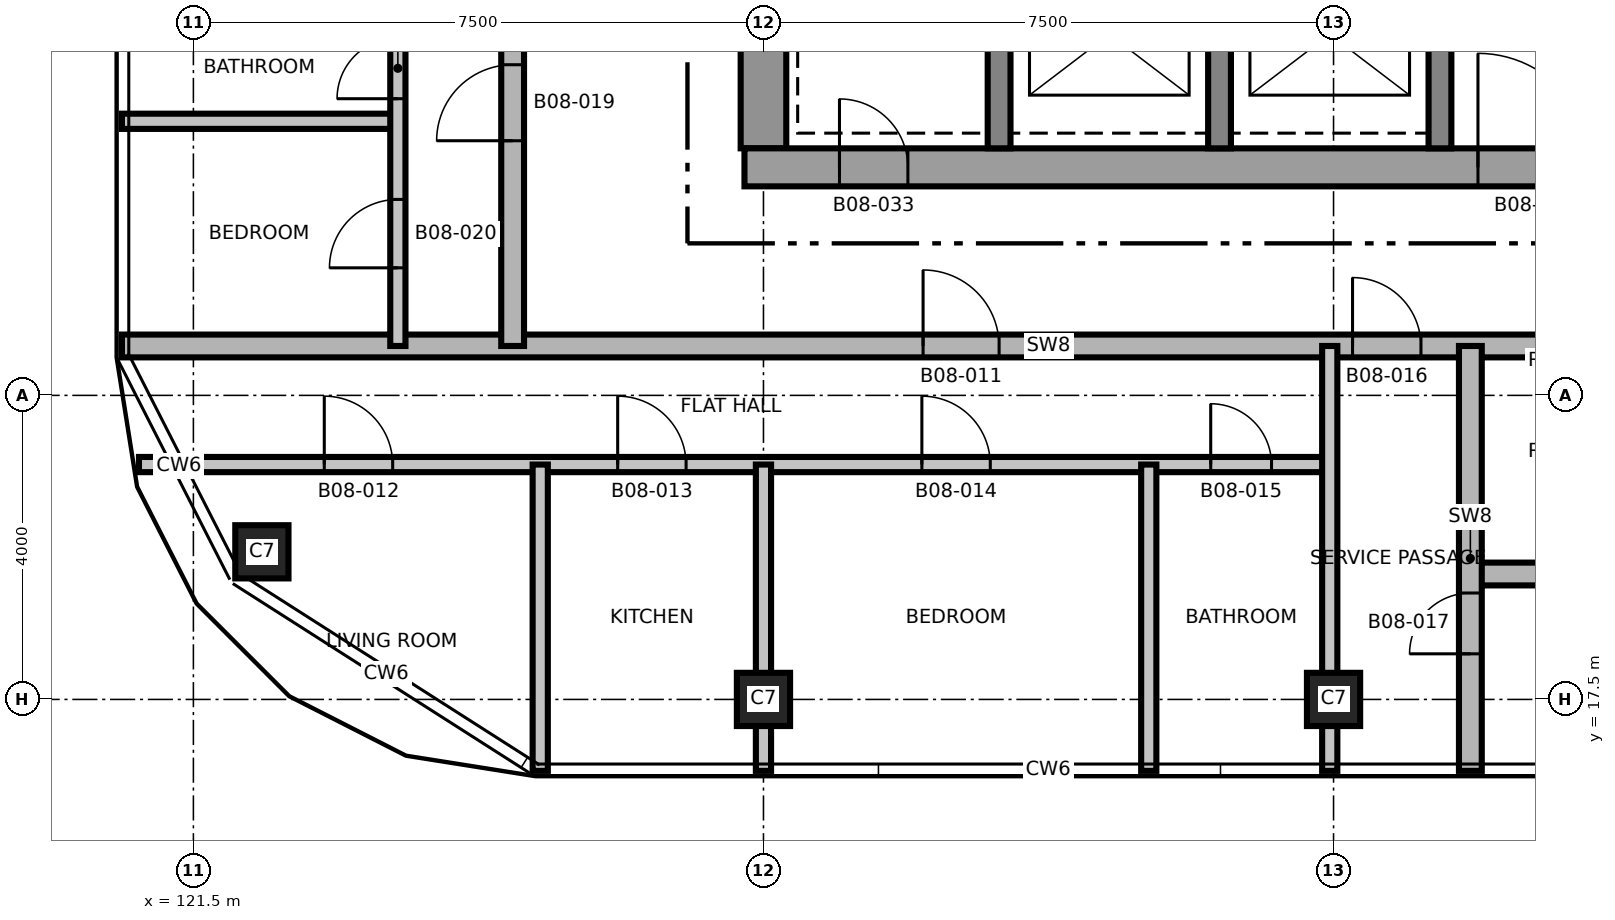
"""IFC4 building model, lengths in metres.
Left out: names, types, materials, properties, quantities, classifications, styles, units other than length and angle.
Written with IfcOpenShell. Run it as: python <this file> out.ifc"""

import sys

from ifc_helpers import new_model, si_unit, direction, frame, frame_2d, origin, origin_2d, place, context, subcontext, project, spatial, rectangle, extrude, element, fill, save


model = new_model("IFC4")
c1 = context("Model", 3, precision=1e-05, world=origin(), true_north=direction((0.0, 1.0)))
c2 = subcontext(c1, "Body", "Model", "MODEL_VIEW")
j1 = project(units=[si_unit("LENGTHUNIT", "METRE"), si_unit("PLANEANGLEUNIT", "RADIAN")], contexts=[c1])
p1 = place(None, origin())
s1 = spatial("IfcSite", under=j1, at=p1, CompositionType="ELEMENT")
p2 = place(p1, origin())
s2 = spatial("IfcBuilding", under=s1, at=p2, CompositionType="ELEMENT")
p3 = place(p2, frame((0.0, 0.0, 94.5)))
s3 = spatial("IfcBuildingStorey", under=s2, at=p3, CompositionType="ELEMENT", Elevation=94.5)
p4 = place(p3, frame((129.0, 24.75, 0.0), z_axis=(0.0, 0.0, 1.0), x_axis=(0.0, 1.0, 0.0)))
e1 = element("IfcWall", 1, at=p4, inside=s3, PredefinedType="SHEAR", context=c2, shape_type="SweptSolid", body=[
    extrude(rectangle(XDim=12.5, YDim=0.6, at=frame_2d((6.25, 0.0))), origin(), (0.0, 0.0, 1.0), 3.7),
])
p5 = place(p4, frame((5.15, 0.0, 0.0)))
e2 = element("IfcOpeningElement", 2, at=p5, cuts=e1, PredefinedType="OPENING", context=c2, shape_type="SweptSolid", body=[
    extrude(rectangle(XDim=1.0, YDim=2.1, at=frame_2d((0.5, 1.05))), frame((0.0, 0.31, 0.0), z_axis=(0.0, -1.0, 0.0), x_axis=(1.0, 0.0, 0.0)), (0.0, 0.0, 1.0), 0.62),
])
p6 = place(p3, frame((128.75, 24.5, 0.0), z_axis=(0.0, 0.0, 1.0), x_axis=(1.0, 0.0, 0.0)))
e3 = element("IfcWall", 3, at=p6, inside=s3, PredefinedType="SHEAR", context=c2, shape_type="SweptSolid", body=[
    extrude(rectangle(XDim=15.0, YDim=0.5, at=frame_2d((7.5, 0.0))), origin(), (0.0, 0.0, 1.0), 3.7),
])
p7 = place(p6, frame((9.65, 0.0, 0.0)))
e4 = element("IfcOpeningElement", 4, at=p7, cuts=e3, PredefinedType="OPENING", context=c2, shape_type="SweptSolid", body=[
    extrude(rectangle(XDim=1.5, YDim=2.1, at=frame_2d((0.75, 1.05))), frame((0.0, 0.26, 0.0), z_axis=(0.0, -1.0, 0.0), x_axis=(1.0, 0.0, 0.0)), (0.0, 0.0, 1.0), 0.52),
])
p8 = place(p6, frame((1.25, 0.0, 0.0)))
e5 = element("IfcOpeningElement", 5, at=p8, cuts=e3, PredefinedType="OPENING", context=c2, shape_type="SweptSolid", body=[
    extrude(rectangle(XDim=0.9, YDim=2.1, at=frame_2d((0.45, 1.05))), frame((0.0, 0.26, 0.0), z_axis=(0.0, -1.0, 0.0), x_axis=(1.0, 0.0, 0.0)), (0.0, 0.0, 1.0), 0.52),
])
p9 = place(p3, frame((132.1, 24.75, 0.0), z_axis=(0.0, 0.0, 1.0), x_axis=(0.0, 1.0, 0.0)))
e6 = element("IfcWall", 6, at=p9, inside=s3, PredefinedType="SHEAR", context=c2, shape_type="SweptSolid", body=[
    extrude(rectangle(XDim=12.5, YDim=0.3, at=frame_2d((6.25, 0.0))), origin(), (0.0, 0.0, 1.0), 3.7),
])
p10 = place(p9, frame((3.9, 0.0, 0.0)))
e7 = element("IfcOpeningElement", 7, at=p10, cuts=e6, PredefinedType="OPENING", context=c2, shape_type="SweptSolid", body=[
    extrude(rectangle(XDim=1.2, YDim=2.1, at=frame_2d((0.6, 1.05))), frame((0.0, 0.16, 0.0), z_axis=(0.0, -1.0, 0.0), x_axis=(1.0, 0.0, 0.0)), (0.0, 0.0, 1.0), 0.32),
])
p11 = place(p3, frame((137.9, 24.75, 0.0), z_axis=(0.0, 0.0, 1.0), x_axis=(0.0, 1.0, 0.0)))
e8 = element("IfcWall", 8, at=p11, inside=s3, PredefinedType="SHEAR", context=c2, shape_type="SweptSolid", body=[
    extrude(rectangle(XDim=12.5, YDim=0.3, at=frame_2d((6.25, 0.0))), origin(), (0.0, 0.0, 1.0), 3.7),
])
p12 = place(p11, frame((3.95, 0.0, 0.0)))
e9 = element("IfcOpeningElement", 9, at=p12, cuts=e8, PredefinedType="OPENING", context=c2, shape_type="SweptSolid", body=[
    extrude(rectangle(XDim=1.5, YDim=2.1, at=frame_2d((0.75, 1.05))), frame((0.0, 0.16, 0.0), z_axis=(0.0, -1.0, 0.0), x_axis=(1.0, 0.0, 0.0)), (0.0, 0.0, 1.0), 0.32),
])
p13 = place(p11, frame((10.45, 0.0, 0.0)))
e10 = element("IfcOpeningElement", 10, at=p13, cuts=e8, PredefinedType="OPENING", context=c2, shape_type="SweptSolid", body=[
    extrude(rectangle(XDim=0.9, YDim=2.1, at=frame_2d((0.45, 1.05))), frame((0.0, 0.16, 0.0), z_axis=(0.0, -1.0, 0.0), x_axis=(1.0, 0.0, 0.0)), (0.0, 0.0, 1.0), 0.32),
])
p14 = place(p3, frame((135.0, 24.75, 0.0), z_axis=(0.0, 0.0, 1.0), x_axis=(0.0, 1.0, 0.0)))
e11 = element("IfcWall", 11, at=p14, inside=s3, PredefinedType="SHEAR", context=c2, shape_type="SweptSolid", body=[
    extrude(rectangle(XDim=2.8, YDim=0.3, at=frame_2d((1.4, 0.0))), origin(), (0.0, 0.0, 1.0), 3.7),
])
for number, where, z_axis, x_axis in (
    (12, (129.0, 17.5, 0.0), (0.0, 0.0, 1.0), (1.0, 0.0, 0.0)),
    (13, (136.5, 17.5, 0.0), (0.0, 0.0, 1.0), (1.0, 0.0, 0.0)),
    (14, (122.401, 19.442, 0.0), (0.0, 0.0, 1.0), (1.0, 0.0, 0.0)),
):
    element("IfcColumn", number, at=place(p3, frame(where, z_axis=z_axis, x_axis=x_axis)), inside=s3, PredefinedType="COLUMN", context=c2, shape_type="SweptSolid", body=[
        extrude(rectangle(XDim=0.7, YDim=0.7, at=origin_2d()), origin(), (0.0, 0.0, 1.0), 3.7),
    ])
p15 = place(p3, frame((138.25, 19.15, 0.0), z_axis=(0.0, 0.0, 1.0), x_axis=(1.0, 0.0, 0.0)))
e15 = element("IfcWall", 15, at=p15, inside=s3, PredefinedType="SHEAR", context=c2, shape_type="SweptSolid", body=[
    extrude(rectangle(XDim=5.75, YDim=0.3, at=frame_2d((2.875, 0.0))), origin(), (0.0, 0.0, 1.0), 3.4),
])
p16 = place(p3, frame((120.784, 20.59, 0.0), z_axis=(0.0, 0.0, 1.0), x_axis=(1.0, 0.0, 0.0)))
e16 = element("IfcWall", 16, at=p16, inside=s3, PredefinedType="PARTITIONING", context=c2, shape_type="SweptSolid", body=[
    extrude(rectangle(XDim=15.716, YDim=0.2, at=frame_2d((7.858, 0.0))), origin(), (0.0, 0.0, 1.0), 3.4),
])
p17 = place(p16, frame((2.438, 0.0, 0.0)))
e17 = element("IfcOpeningElement", 17, at=p17, cuts=e16, PredefinedType="OPENING", context=c2, shape_type="SweptSolid", body=[
    extrude(rectangle(XDim=0.9, YDim=2.1, at=frame_2d((0.45, 1.05))), frame((0.0, 0.11, 0.0), z_axis=(0.0, -1.0, 0.0), x_axis=(1.0, 0.0, 0.0)), (0.0, 0.0, 1.0), 0.22),
])
p18 = place(p16, frame((6.298, 0.0, 0.0)))
e18 = element("IfcOpeningElement", 18, at=p18, cuts=e16, PredefinedType="OPENING", context=c2, shape_type="SweptSolid", body=[
    extrude(rectangle(XDim=0.9, YDim=2.1, at=frame_2d((0.45, 1.05))), frame((0.0, 0.11, 0.0), z_axis=(0.0, -1.0, 0.0), x_axis=(1.0, 0.0, 0.0)), (0.0, 0.0, 1.0), 0.22),
])
p19 = place(p16, frame((10.3, 0.0, 0.0)))
e19 = element("IfcOpeningElement", 19, at=p19, cuts=e16, PredefinedType="OPENING", context=c2, shape_type="SweptSolid", body=[
    extrude(rectangle(XDim=0.9, YDim=2.1, at=frame_2d((0.45, 1.05))), frame((0.0, 0.11, 0.0), z_axis=(0.0, -1.0, 0.0), x_axis=(1.0, 0.0, 0.0)), (0.0, 0.0, 1.0), 0.22),
])
p20 = place(p16, frame((14.1, 0.0, 0.0)))
e20 = element("IfcOpeningElement", 20, at=p20, cuts=e16, PredefinedType="OPENING", context=c2, shape_type="SweptSolid", body=[
    extrude(rectangle(XDim=0.8, YDim=2.1, at=frame_2d((0.4, 1.05))), frame((0.0, 0.11, 0.0), z_axis=(0.0, -1.0, 0.0), x_axis=(1.0, 0.0, 0.0)), (0.0, 0.0, 1.0), 0.22),
])
p21 = place(p3, frame((120.56, 22.15, 0.0), z_axis=(0.0, 0.0, 1.0), x_axis=(1.0, 0.0, 0.0)))
e21 = element("IfcWall", 21, at=p21, inside=s3, PredefinedType="SHEAR", context=c2, shape_type="SweptSolid", body=[
    extrude(rectangle(XDim=24.38, YDim=0.3, at=frame_2d((12.19, 0.0))), origin(), (0.0, 0.0, 1.0), 3.4),
])
p22 = place(p21, frame((22.19, 0.0, 0.0)))
e22 = element("IfcOpeningElement", 22, at=p22, cuts=e21, PredefinedType="OPENING", context=c2, shape_type="SweptSolid", body=[
    extrude(rectangle(XDim=1.0, YDim=2.1, at=frame_2d((0.5, 1.05))), frame((0.0, 0.16, 0.0), z_axis=(0.0, -1.0, 0.0), x_axis=(1.0, 0.0, 0.0)), (0.0, 0.0, 1.0), 0.32),
])
p23 = place(p21, frame((10.54, 0.0, 0.0)))
e23 = element("IfcOpeningElement", 23, at=p23, cuts=e21, PredefinedType="OPENING", context=c2, shape_type="SweptSolid", body=[
    extrude(rectangle(XDim=1.0, YDim=2.1, at=frame_2d((0.5, 1.05))), frame((0.0, 0.16, 0.0), z_axis=(0.0, -1.0, 0.0), x_axis=(1.0, 0.0, 0.0)), (0.0, 0.0, 1.0), 0.32),
])
p24 = place(p21, frame((16.19, 0.0, 0.0)))
e24 = element("IfcOpeningElement", 24, at=p24, cuts=e21, PredefinedType="OPENING", context=c2, shape_type="SweptSolid", body=[
    extrude(rectangle(XDim=0.9, YDim=2.1, at=frame_2d((0.45, 1.05))), frame((0.0, 0.16, 0.0), z_axis=(0.0, -1.0, 0.0), x_axis=(1.0, 0.0, 0.0)), (0.0, 0.0, 1.0), 0.32),
])
p25 = place(p3, frame((120.56, 25.106, 0.0), z_axis=(0.0, 0.0, 1.0), x_axis=(1.0, 0.0, 0.0)))
e25 = element("IfcWall", 25, at=p25, inside=s3, PredefinedType="PARTITIONING", context=c2, shape_type="SweptSolid", body=[
    extrude(rectangle(XDim=3.63, YDim=0.2, at=frame_2d((1.815, 0.0))), origin(), (0.0, 0.0, 1.0), 3.4),
])
p26 = place(p3, frame((124.19, 22.15, 0.0), z_axis=(0.0, 0.0, 1.0), x_axis=(0.0, 1.0, 0.0)))
e26 = element("IfcWall", 26, at=p26, inside=s3, PredefinedType="PARTITIONING", context=c2, shape_type="SweptSolid", body=[
    extrude(rectangle(XDim=17.7, YDim=0.2, at=frame_2d((8.85, 0.0))), origin(), (0.0, 0.0, 1.0), 3.4),
])
p27 = place(p26, frame((1.028, 0.0, 0.0)))
e27 = element("IfcOpeningElement", 27, at=p27, cuts=e26, PredefinedType="OPENING", context=c2, shape_type="SweptSolid", body=[
    extrude(rectangle(XDim=0.9, YDim=2.1, at=frame_2d((0.45, 1.05))), frame((0.0, 0.11, 0.0), z_axis=(0.0, -1.0, 0.0), x_axis=(1.0, 0.0, 0.0)), (0.0, 0.0, 1.0), 0.22),
])
p28 = place(p26, frame((3.253, 0.0, 0.0)))
e28 = element("IfcOpeningElement", 28, at=p28, cuts=e26, PredefinedType="OPENING", context=c2, shape_type="SweptSolid", body=[
    extrude(rectangle(XDim=0.8, YDim=2.1, at=frame_2d((0.4, 1.05))), frame((0.0, 0.11, 0.0), z_axis=(0.0, -1.0, 0.0), x_axis=(1.0, 0.0, 0.0)), (0.0, 0.0, 1.0), 0.22),
])
p29 = place(p26, frame((6.195, 0.0, 0.0)))
e29 = element("IfcOpeningElement", 29, at=p29, cuts=e26, PredefinedType="OPENING", context=c2, shape_type="SweptSolid", body=[
    extrude(rectangle(XDim=0.9, YDim=2.1, at=frame_2d((0.45, 1.05))), frame((0.0, 0.11, 0.0), z_axis=(0.0, -1.0, 0.0), x_axis=(1.0, 0.0, 0.0)), (0.0, 0.0, 1.0), 0.22),
])
p30 = place(p26, frame((9.641, 0.0, 0.0)))
e30 = element("IfcOpeningElement", 30, at=p30, cuts=e26, PredefinedType="OPENING", context=c2, shape_type="SweptSolid", body=[
    extrude(rectangle(XDim=0.9, YDim=2.1, at=frame_2d((0.45, 1.05))), frame((0.0, 0.11, 0.0), z_axis=(0.0, -1.0, 0.0), x_axis=(1.0, 0.0, 0.0)), (0.0, 0.0, 1.0), 0.22),
])
p31 = place(p26, frame((11.895, 0.0, 0.0)))
e31 = element("IfcOpeningElement", 31, at=p31, cuts=e26, PredefinedType="OPENING", context=c2, shape_type="SweptSolid", body=[
    extrude(rectangle(XDim=0.8, YDim=2.1, at=frame_2d((0.4, 1.05))), frame((0.0, 0.11, 0.0), z_axis=(0.0, -1.0, 0.0), x_axis=(1.0, 0.0, 0.0)), (0.0, 0.0, 1.0), 0.22),
])
p32 = place(p26, frame((14.378, 0.0, 0.0)))
e32 = element("IfcOpeningElement", 32, at=p32, cuts=e26, PredefinedType="OPENING", context=c2, shape_type="SweptSolid", body=[
    extrude(rectangle(XDim=0.9, YDim=2.1, at=frame_2d((0.45, 1.05))), frame((0.0, 0.11, 0.0), z_axis=(0.0, -1.0, 0.0), x_axis=(1.0, 0.0, 0.0)), (0.0, 0.0, 1.0), 0.22),
])
p33 = place(p26, frame((16.603, 0.0, 0.0)))
e33 = element("IfcOpeningElement", 33, at=p33, cuts=e26, PredefinedType="OPENING", context=c2, shape_type="SweptSolid", body=[
    extrude(rectangle(XDim=0.8, YDim=2.1, at=frame_2d((0.4, 1.05))), frame((0.0, 0.11, 0.0), z_axis=(0.0, -1.0, 0.0), x_axis=(1.0, 0.0, 0.0)), (0.0, 0.0, 1.0), 0.22),
])
p34 = place(p3, frame((125.7, 22.15, 0.0), z_axis=(0.0, 0.0, 1.0), x_axis=(0.0, 1.0, 0.0)))
e34 = element("IfcWall", 34, at=p34, inside=s3, PredefinedType="SHEAR", context=c2, shape_type="SweptSolid", body=[
    extrude(rectangle(XDim=17.7, YDim=0.3, at=frame_2d((8.85, 0.0))), origin(), (0.0, 0.0, 1.0), 3.4),
])
p35 = place(p34, frame((2.7, 0.0, 0.0)))
e35 = element("IfcOpeningElement", 35, at=p35, cuts=e34, PredefinedType="OPENING", context=c2, shape_type="SweptSolid", body=[
    extrude(rectangle(XDim=1.0, YDim=2.1, at=frame_2d((0.5, 1.05))), frame((0.0, 0.16, 0.0), z_axis=(0.0, -1.0, 0.0), x_axis=(1.0, 0.0, 0.0)), (0.0, 0.0, 1.0), 0.32),
])
for number, where, z_axis, x_axis in (
    (36, (126.063, 16.56, 0.0), (0.0, 0.0, 1.0), (0.0, 1.0, 0.0)),
    (37, (129.0, 16.56, 0.0), (0.0, 0.0, 1.0), (0.0, 1.0, 0.0)),
    (38, (134.069, 16.56, 0.0), (0.0, 0.0, 1.0), (0.0, 1.0, 0.0)),
):
    element("IfcWall", number, at=place(p3, frame(where, z_axis=z_axis, x_axis=x_axis)), inside=s3, PredefinedType="PARTITIONING", context=c2, shape_type="SweptSolid", body=[
        extrude(rectangle(XDim=4.03, YDim=0.2, at=frame_2d((2.015, 0.0))), origin(), (0.0, 0.0, 1.0), 3.4),
    ])
p36 = place(p3, frame((136.45, 16.56, 0.0), z_axis=(0.0, 0.0, 1.0), x_axis=(0.0, 1.0, 0.0)))
e39 = element("IfcWall", 39, at=p36, inside=s3, PredefinedType="PARTITIONING", context=c2, shape_type="SweptSolid", body=[
    extrude(rectangle(XDim=5.59, YDim=0.2, at=frame_2d((2.795, 0.0))), origin(), (0.0, 0.0, 1.0), 3.4),
])
p37 = place(p3, frame((138.3, 16.56, 0.0), z_axis=(0.0, 0.0, 1.0), x_axis=(0.0, 1.0, 0.0)))
e40 = element("IfcWall", 40, at=p37, inside=s3, PredefinedType="SHEAR", context=c2, shape_type="SweptSolid", body=[
    extrude(rectangle(XDim=5.59, YDim=0.3, at=frame_2d((2.795, 0.0))), origin(), (0.0, 0.0, 1.0), 3.4),
])
p38 = place(p37, frame((1.54, 0.0, 0.0)))
e41 = element("IfcOpeningElement", 41, at=p38, cuts=e40, PredefinedType="OPENING", context=c2, shape_type="SweptSolid", body=[
    extrude(rectangle(XDim=0.8, YDim=2.1, at=frame_2d((0.4, 1.05))), frame((0.0, 0.16, 0.0), z_axis=(0.0, -1.0, 0.0), x_axis=(1.0, 0.0, 0.0)), (0.0, 0.0, 1.0), 0.32),
])
p39 = place(p23, origin())
e42 = element("IfcDoor", 42, at=p39, inside=s3, OperationType="SINGLE_SWING_LEFT", PredefinedType="DOOR", context=c2, shape_type="SweptSolid", body=[
    extrude(rectangle(XDim=1.0, YDim=2.1, at=frame_2d((0.5, 1.05))), frame((0.0, 0.025, 0.0), z_axis=(0.0, -1.0, 0.0), x_axis=(1.0, 0.0, 0.0)), (0.0, 0.0, 1.0), 0.05),
])
fill(e23, e42)
p40 = place(p17, origin())
e43 = element("IfcDoor", 43, at=p40, inside=s3, OperationType="SINGLE_SWING_RIGHT", PredefinedType="DOOR", context=c2, shape_type="SweptSolid", body=[
    extrude(rectangle(XDim=0.9, YDim=2.1, at=frame_2d((0.45, 1.05))), frame((0.0, 0.025, 0.0), z_axis=(0.0, -1.0, 0.0), x_axis=(1.0, 0.0, 0.0)), (0.0, 0.0, 1.0), 0.05),
])
fill(e17, e43)
p41 = place(p18, origin())
e44 = element("IfcDoor", 44, at=p41, inside=s3, OperationType="SINGLE_SWING_LEFT", PredefinedType="DOOR", context=c2, shape_type="SweptSolid", body=[
    extrude(rectangle(XDim=0.9, YDim=2.1, at=frame_2d((0.45, 1.05))), frame((0.0, 0.025, 0.0), z_axis=(0.0, -1.0, 0.0), x_axis=(1.0, 0.0, 0.0)), (0.0, 0.0, 1.0), 0.05),
])
fill(e18, e44)
p42 = place(p19, origin())
e45 = element("IfcDoor", 45, at=p42, inside=s3, OperationType="SINGLE_SWING_RIGHT", PredefinedType="DOOR", context=c2, shape_type="SweptSolid", body=[
    extrude(rectangle(XDim=0.9, YDim=2.1, at=frame_2d((0.45, 1.05))), frame((0.0, 0.025, 0.0), z_axis=(0.0, -1.0, 0.0), x_axis=(1.0, 0.0, 0.0)), (0.0, 0.0, 1.0), 0.05),
])
fill(e19, e45)
p43 = place(p20, origin())
e46 = element("IfcDoor", 46, at=p43, inside=s3, OperationType="SINGLE_SWING_LEFT", PredefinedType="DOOR", context=c2, shape_type="SweptSolid", body=[
    extrude(rectangle(XDim=0.8, YDim=2.1, at=frame_2d((0.4, 1.05))), frame((0.0, 0.025, 0.0), z_axis=(0.0, -1.0, 0.0), x_axis=(1.0, 0.0, 0.0)), (0.0, 0.0, 1.0), 0.05),
])
fill(e20, e46)
p44 = place(p24, origin())
e47 = element("IfcDoor", 47, at=p44, inside=s3, OperationType="SINGLE_SWING_RIGHT", PredefinedType="DOOR", context=c2, shape_type="SweptSolid", body=[
    extrude(rectangle(XDim=0.9, YDim=2.1, at=frame_2d((0.45, 1.05))), frame((0.0, 0.025, 0.0), z_axis=(0.0, -1.0, 0.0), x_axis=(1.0, 0.0, 0.0)), (0.0, 0.0, 1.0), 0.05),
])
fill(e24, e47)
p45 = place(p38, origin())
e48 = element("IfcDoor", 48, at=p45, inside=s3, OperationType="SINGLE_SWING_LEFT", PredefinedType="DOOR", context=c2, shape_type="SweptSolid", body=[
    extrude(rectangle(XDim=0.8, YDim=2.1, at=frame_2d((0.4, 1.05))), frame((0.0, 0.025, 0.0), z_axis=(0.0, -1.0, 0.0), x_axis=(1.0, 0.0, 0.0)), (0.0, 0.0, 1.0), 0.05),
])
fill(e41, e48)
p46 = place(p35, origin())
e49 = element("IfcDoor", 49, at=p46, inside=s3, OperationType="SINGLE_SWING_LEFT", PredefinedType="DOOR", context=c2, shape_type="SweptSolid", body=[
    extrude(rectangle(XDim=1.0, YDim=2.1, at=frame_2d((0.5, 1.05))), frame((0.0, 0.025, 0.0), z_axis=(0.0, -1.0, 0.0), x_axis=(1.0, 0.0, 0.0)), (0.0, 0.0, 1.0), 0.05),
])
fill(e35, e49)
p47 = place(p27, origin())
e50 = element("IfcDoor", 50, at=p47, inside=s3, OperationType="SINGLE_SWING_RIGHT", PredefinedType="DOOR", context=c2, shape_type="SweptSolid", body=[
    extrude(rectangle(XDim=0.9, YDim=2.1, at=frame_2d((0.45, 1.05))), frame((0.0, 0.025, 0.0), z_axis=(0.0, -1.0, 0.0), x_axis=(1.0, 0.0, 0.0)), (0.0, 0.0, 1.0), 0.05),
])
fill(e27, e50)
p48 = place(p28, origin())
e51 = element("IfcDoor", 51, at=p48, inside=s3, OperationType="SINGLE_SWING_LEFT", PredefinedType="DOOR", context=c2, shape_type="SweptSolid", body=[
    extrude(rectangle(XDim=0.8, YDim=2.1, at=frame_2d((0.4, 1.05))), frame((0.0, 0.025, 0.0), z_axis=(0.0, -1.0, 0.0), x_axis=(1.0, 0.0, 0.0)), (0.0, 0.0, 1.0), 0.05),
])
fill(e28, e51)
p49 = place(p7, origin())
e52 = element("IfcDoor", 52, at=p49, inside=s3, OperationType="SINGLE_SWING_LEFT", PredefinedType="DOOR", context=c2, shape_type="SweptSolid", body=[
    extrude(rectangle(XDim=1.5, YDim=2.1, at=frame_2d((0.75, 1.05))), frame((0.0, 0.025, 0.0), z_axis=(0.0, -1.0, 0.0), x_axis=(1.0, 0.0, 0.0)), (0.0, 0.0, 1.0), 0.05),
])
fill(e4, e52)
p50 = place(p8, origin())
e53 = element("IfcDoor", 53, at=p50, inside=s3, OperationType="SINGLE_SWING_LEFT", PredefinedType="DOOR", context=c2, shape_type="SweptSolid", body=[
    extrude(rectangle(XDim=0.9, YDim=2.1, at=frame_2d((0.45, 1.05))), frame((0.0, 0.025, 0.0), z_axis=(0.0, -1.0, 0.0), x_axis=(1.0, 0.0, 0.0)), (0.0, 0.0, 1.0), 0.05),
])
fill(e5, e53)
save(model, sys.argv[1])
